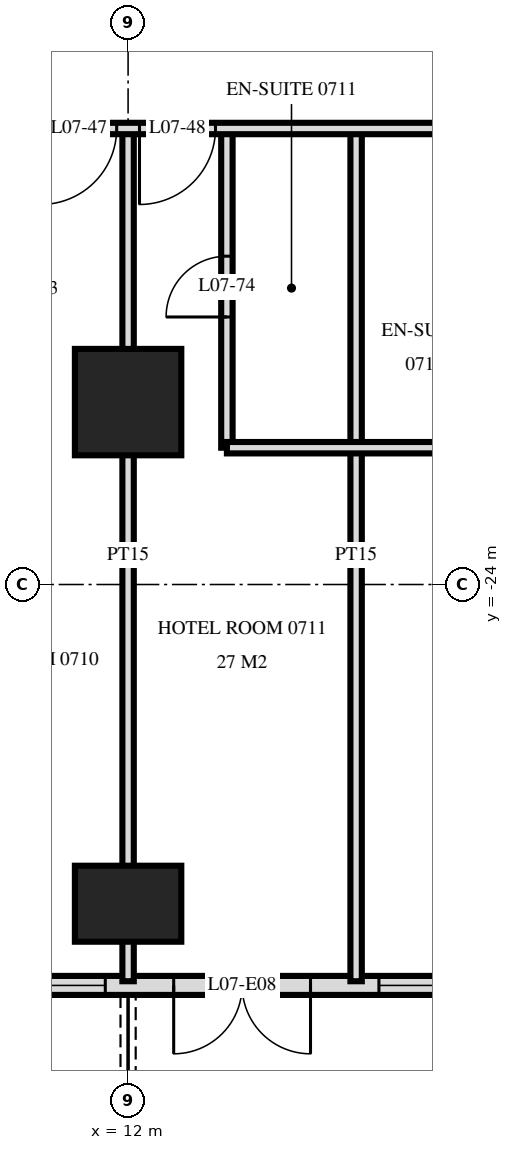
"""IFC4 building model, lengths in metres.
Left out: names, types, materials, properties, quantities, classifications, styles, units other than length and angle.
Written with IfcOpenShell. Run it as: python <this file> out.ifc"""

import sys

from ifc_helpers import new_model, si_unit, direction, frame, frame_2d, origin, origin_2d, place, context, subcontext, project, spatial, rectangle, extrude, element, fill, save


model = new_model("IFC4")
c1 = context("Model", 3, precision=1e-05, world=origin(), true_north=direction((0.0, 1.0)))
c2 = subcontext(c1, "Body", "Model", "MODEL_VIEW")
j1 = project(units=[si_unit("LENGTHUNIT", "METRE"), si_unit("PLANEANGLEUNIT", "RADIAN")], contexts=[c1])
p1 = place(None, origin())
s1 = spatial("IfcSite", under=j1, at=p1, CompositionType="ELEMENT")
p2 = place(p1, origin())
s2 = spatial("IfcBuilding", under=s1, at=p2, CompositionType="ELEMENT")
p3 = place(p2, frame((0.0, 0.0, 34.8)))
s3 = spatial("IfcBuildingStorey", under=s2, at=p3, CompositionType="ELEMENT", Elevation=34.8)
p4 = place(p3, frame((12.0, -28.2, 0.0), z_axis=(0.0, 0.0, 1.0), x_axis=(1.0, 0.0, 0.0)))
e1 = element("IfcColumn", 1, at=p4, inside=s3, PredefinedType="COLUMN", context=c2, shape_type="SweptSolid", body=[
    extrude(rectangle(XDim=1.4, YDim=1.0, at=origin_2d()), origin(), (0.0, 0.0, 1.0), 3.6),
])
p5 = place(p3, frame((12.0, -21.6, 0.0), z_axis=(0.0, 0.0, 1.0), x_axis=(1.0, 0.0, 0.0)))
e2 = element("IfcColumn", 2, at=p5, inside=s3, PredefinedType="COLUMN", context=c2, shape_type="SweptSolid", body=[
    extrude(rectangle(XDim=1.4, YDim=1.4, at=origin_2d()), origin(), (0.0, 0.0, 1.0), 3.6),
])
p6 = place(p3, frame((-28.775, -29.275, 0.0), z_axis=(0.0, 0.0, 1.0), x_axis=(1.0, 0.0, 0.0)))
e3 = element("IfcWall", 3, at=p6, inside=s3, PredefinedType="SOLIDWALL", context=c2, shape_type="SweptSolid", body=[
    extrude(rectangle(XDim=57.551, YDim=0.25, at=frame_2d((28.775, 0.0))), origin(), (0.0, 0.0, 1.0), 3.32),
])
p7 = place(p6, frame((0.575, 0.0, 0.0)))
e4 = element("IfcOpeningElement", 4, at=p7, cuts=e3, PredefinedType="OPENING", context=c2, shape_type="SweptSolid", body=[
    extrude(rectangle(XDim=1.8, YDim=2.4, at=frame_2d((0.9, 1.2))), frame((0.0, 0.135, 0.0), z_axis=(0.0, -1.0, 0.0), x_axis=(1.0, 0.0, 0.0)), (0.0, 0.0, 1.0), 0.27),
])
p8 = place(p6, frame((5.375, 0.0, 0.0)))
e5 = element("IfcOpeningElement", 5, at=p8, cuts=e3, PredefinedType="OPENING", context=c2, shape_type="SweptSolid", body=[
    extrude(rectangle(XDim=1.8, YDim=2.4, at=frame_2d((0.9, 1.2))), frame((0.0, 0.135, 0.0), z_axis=(0.0, -1.0, 0.0), x_axis=(1.0, 0.0, 0.0)), (0.0, 0.0, 1.0), 0.27),
])
p9 = place(p6, frame((8.075, 0.0, 0.3)))
e6 = element("IfcOpeningElement", 6, at=p9, cuts=e3, PredefinedType="OPENING", context=c2, shape_type="SweptSolid", body=[
    extrude(rectangle(XDim=2.4, YDim=2.1, at=frame_2d((1.2, 1.05))), frame((0.0, 0.135, 0.0), z_axis=(0.0, -1.0, 0.0), x_axis=(1.0, 0.0, 0.0)), (0.0, 0.0, 1.0), 0.27),
])
p10 = place(p6, frame((11.375, 0.0, 0.0)))
e7 = element("IfcOpeningElement", 7, at=p10, cuts=e3, PredefinedType="OPENING", context=c2, shape_type="SweptSolid", body=[
    extrude(rectangle(XDim=1.8, YDim=2.4, at=frame_2d((0.9, 1.2))), frame((0.0, 0.135, 0.0), z_axis=(0.0, -1.0, 0.0), x_axis=(1.0, 0.0, 0.0)), (0.0, 0.0, 1.0), 0.27),
])
p11 = place(p6, frame((14.075, 0.0, 0.3)))
e8 = element("IfcOpeningElement", 8, at=p11, cuts=e3, PredefinedType="OPENING", context=c2, shape_type="SweptSolid", body=[
    extrude(rectangle(XDim=2.4, YDim=2.1, at=frame_2d((1.2, 1.05))), frame((0.0, 0.135, 0.0), z_axis=(0.0, -1.0, 0.0), x_axis=(1.0, 0.0, 0.0)), (0.0, 0.0, 1.0), 0.27),
])
p12 = place(p6, frame((17.375, 0.0, 0.0)))
e9 = element("IfcOpeningElement", 9, at=p12, cuts=e3, PredefinedType="OPENING", context=c2, shape_type="SweptSolid", body=[
    extrude(rectangle(XDim=1.8, YDim=2.4, at=frame_2d((0.9, 1.2))), frame((0.0, 0.135, 0.0), z_axis=(0.0, -1.0, 0.0), x_axis=(1.0, 0.0, 0.0)), (0.0, 0.0, 1.0), 0.27),
])
p13 = place(p6, frame((20.075, 0.0, 0.3)))
e10 = element("IfcOpeningElement", 10, at=p13, cuts=e3, PredefinedType="OPENING", context=c2, shape_type="SweptSolid", body=[
    extrude(rectangle(XDim=2.4, YDim=2.1, at=frame_2d((1.2, 1.05))), frame((0.0, 0.135, 0.0), z_axis=(0.0, -1.0, 0.0), x_axis=(1.0, 0.0, 0.0)), (0.0, 0.0, 1.0), 0.27),
])
p14 = place(p6, frame((23.075, 0.0, 0.3)))
e11 = element("IfcOpeningElement", 11, at=p14, cuts=e3, PredefinedType="OPENING", context=c2, shape_type="SweptSolid", body=[
    extrude(rectangle(XDim=2.4, YDim=2.1, at=frame_2d((1.2, 1.05))), frame((0.0, 0.135, 0.0), z_axis=(0.0, -1.0, 0.0), x_axis=(1.0, 0.0, 0.0)), (0.0, 0.0, 1.0), 0.27),
])
p15 = place(p6, frame((26.375, 0.0, 0.0)))
e12 = element("IfcOpeningElement", 12, at=p15, cuts=e3, PredefinedType="OPENING", context=c2, shape_type="SweptSolid", body=[
    extrude(rectangle(XDim=1.8, YDim=2.4, at=frame_2d((0.9, 1.2))), frame((0.0, 0.135, 0.0), z_axis=(0.0, -1.0, 0.0), x_axis=(1.0, 0.0, 0.0)), (0.0, 0.0, 1.0), 0.27),
])
p16 = place(p6, frame((29.375, 0.0, 0.0)))
e13 = element("IfcOpeningElement", 13, at=p16, cuts=e3, PredefinedType="OPENING", context=c2, shape_type="SweptSolid", body=[
    extrude(rectangle(XDim=1.8, YDim=2.4, at=frame_2d((0.9, 1.2))), frame((0.0, 0.135, 0.0), z_axis=(0.0, -1.0, 0.0), x_axis=(1.0, 0.0, 0.0)), (0.0, 0.0, 1.0), 0.27),
])
p17 = place(p6, frame((32.075, 0.0, 0.3)))
e14 = element("IfcOpeningElement", 14, at=p17, cuts=e3, PredefinedType="OPENING", context=c2, shape_type="SweptSolid", body=[
    extrude(rectangle(XDim=2.4, YDim=2.1, at=frame_2d((1.2, 1.05))), frame((0.0, 0.135, 0.0), z_axis=(0.0, -1.0, 0.0), x_axis=(1.0, 0.0, 0.0)), (0.0, 0.0, 1.0), 0.27),
])
p18 = place(p6, frame((35.375, 0.0, 0.0)))
e15 = element("IfcOpeningElement", 15, at=p18, cuts=e3, PredefinedType="OPENING", context=c2, shape_type="SweptSolid", body=[
    extrude(rectangle(XDim=1.8, YDim=2.4, at=frame_2d((0.9, 1.2))), frame((0.0, 0.135, 0.0), z_axis=(0.0, -1.0, 0.0), x_axis=(1.0, 0.0, 0.0)), (0.0, 0.0, 1.0), 0.27),
])
p19 = place(p6, frame((38.075, 0.0, 0.3)))
e16 = element("IfcOpeningElement", 16, at=p19, cuts=e3, PredefinedType="OPENING", context=c2, shape_type="SweptSolid", body=[
    extrude(rectangle(XDim=2.4, YDim=2.1, at=frame_2d((1.2, 1.05))), frame((0.0, 0.135, 0.0), z_axis=(0.0, -1.0, 0.0), x_axis=(1.0, 0.0, 0.0)), (0.0, 0.0, 1.0), 0.27),
])
p20 = place(p6, frame((41.375, 0.0, 0.0)))
e17 = element("IfcOpeningElement", 17, at=p20, cuts=e3, PredefinedType="OPENING", context=c2, shape_type="SweptSolid", body=[
    extrude(rectangle(XDim=1.8, YDim=2.4, at=frame_2d((0.9, 1.2))), frame((0.0, 0.135, 0.0), z_axis=(0.0, -1.0, 0.0), x_axis=(1.0, 0.0, 0.0)), (0.0, 0.0, 1.0), 0.27),
])
p21 = place(p6, frame((44.075, 0.0, 0.3)))
e18 = element("IfcOpeningElement", 18, at=p21, cuts=e3, PredefinedType="OPENING", context=c2, shape_type="SweptSolid", body=[
    extrude(rectangle(XDim=2.4, YDim=2.1, at=frame_2d((1.2, 1.05))), frame((0.0, 0.135, 0.0), z_axis=(0.0, -1.0, 0.0), x_axis=(1.0, 0.0, 0.0)), (0.0, 0.0, 1.0), 0.27),
])
p22 = place(p6, frame((47.375, 0.0, 0.0)))
e19 = element("IfcOpeningElement", 19, at=p22, cuts=e3, PredefinedType="OPENING", context=c2, shape_type="SweptSolid", body=[
    extrude(rectangle(XDim=1.8, YDim=2.4, at=frame_2d((0.9, 1.2))), frame((0.0, 0.135, 0.0), z_axis=(0.0, -1.0, 0.0), x_axis=(1.0, 0.0, 0.0)), (0.0, 0.0, 1.0), 0.27),
])
p23 = place(p6, frame((50.075, 0.0, 0.3)))
e20 = element("IfcOpeningElement", 20, at=p23, cuts=e3, PredefinedType="OPENING", context=c2, shape_type="SweptSolid", body=[
    extrude(rectangle(XDim=2.4, YDim=2.1, at=frame_2d((1.2, 1.05))), frame((0.0, 0.135, 0.0), z_axis=(0.0, -1.0, 0.0), x_axis=(1.0, 0.0, 0.0)), (0.0, 0.0, 1.0), 0.27),
])
p24 = place(p6, frame((53.375, 0.0, 0.0)))
e21 = element("IfcOpeningElement", 21, at=p24, cuts=e3, PredefinedType="OPENING", context=c2, shape_type="SweptSolid", body=[
    extrude(rectangle(XDim=1.8, YDim=2.4, at=frame_2d((0.9, 1.2))), frame((0.0, 0.135, 0.0), z_axis=(0.0, -1.0, 0.0), x_axis=(1.0, 0.0, 0.0)), (0.0, 0.0, 1.0), 0.27),
])
p25 = place(p3, frame((15.0, -29.22, 0.0), z_axis=(0.0, 0.0, 1.0), x_axis=(0.0, 1.0, 0.0)))
e22 = element("IfcWall", 22, at=p25, inside=s3, PredefinedType="PARTITIONING", context=c2, shape_type="SweptSolid", body=[
    extrude(rectangle(XDim=11.22, YDim=0.15, at=frame_2d((5.61, 0.0))), origin(), (0.0, 0.0, 1.0), 3.32),
])
p26 = place(p3, frame((13.3, -22.2, 0.0), z_axis=(0.0, 0.0, 1.0), x_axis=(0.0, 1.0, 0.0)))
e23 = element("IfcWall", 23, at=p26, inside=s3, PredefinedType="PARTITIONING", context=c2, shape_type="SweptSolid", body=[
    extrude(rectangle(XDim=4.2, YDim=0.15, at=frame_2d((2.1, 0.0))), origin(), (0.0, 0.0, 1.0), 3.32),
])
p27 = place(p26, frame((1.72, 0.0, 0.0)))
e24 = element("IfcOpeningElement", 24, at=p27, cuts=e23, PredefinedType="OPENING", context=c2, shape_type="SweptSolid", body=[
    extrude(rectangle(XDim=0.8, YDim=2.1, at=frame_2d((0.4, 1.05))), frame((0.0, 0.085, 0.0), z_axis=(0.0, -1.0, 0.0), x_axis=(1.0, 0.0, 0.0)), (0.0, 0.0, 1.0), 0.17),
])
p28 = place(p3, frame((12.0, -29.22, 0.0), z_axis=(0.0, 0.0, 1.0), x_axis=(0.0, 1.0, 0.0)))
e25 = element("IfcWall", 25, at=p28, inside=s3, PredefinedType="PARTITIONING", context=c2, shape_type="SweptSolid", body=[
    extrude(rectangle(XDim=11.22, YDim=0.15, at=frame_2d((5.61, 0.0))), origin(), (0.0, 0.0, 1.0), 3.32),
])
p29 = place(p3, frame((13.3, -22.2, 0.0), z_axis=(0.0, 0.0, 1.0), x_axis=(1.0, 0.0, 0.0)))
e26 = element("IfcWall", 26, at=p29, inside=s3, PredefinedType="PARTITIONING", context=c2, shape_type="SweptSolid", body=[
    extrude(rectangle(XDim=4.4, YDim=0.15, at=frame_2d((2.2, 0.0))), origin(), (0.0, 0.0, 1.0), 3.32),
])
p30 = place(p3, frame((-33.12, -18.0, 0.0), z_axis=(0.0, 0.0, 1.0), x_axis=(1.0, 0.0, 0.0)))
e27 = element("IfcWall", 27, at=p30, inside=s3, PredefinedType="PARTITIONING", context=c2, shape_type="SweptSolid", body=[
    extrude(rectangle(XDim=66.24, YDim=0.15, at=frame_2d((33.12, 0.0))), origin(), (0.0, 0.0, 1.0), 3.32),
])
p31 = place(p30, frame((12.27, 0.0, 0.0)))
e28 = element("IfcOpeningElement", 28, at=p31, cuts=e27, PredefinedType="OPENING", context=c2, shape_type="SweptSolid", body=[
    extrude(rectangle(XDim=1.0, YDim=2.1, at=frame_2d((0.5, 1.05))), frame((0.0, 0.085, 0.0), z_axis=(0.0, -1.0, 0.0), x_axis=(1.0, 0.0, 0.0)), (0.0, 0.0, 1.0), 0.17),
])
p32 = place(p30, frame((16.97, 0.0, 0.0)))
e29 = element("IfcOpeningElement", 29, at=p32, cuts=e27, PredefinedType="OPENING", context=c2, shape_type="SweptSolid", body=[
    extrude(rectangle(XDim=1.0, YDim=2.1, at=frame_2d((0.5, 1.05))), frame((0.0, 0.085, 0.0), z_axis=(0.0, -1.0, 0.0), x_axis=(1.0, 0.0, 0.0)), (0.0, 0.0, 1.0), 0.17),
])
p33 = place(p30, frame((18.27, 0.0, 0.0)))
e30 = element("IfcOpeningElement", 30, at=p33, cuts=e27, PredefinedType="OPENING", context=c2, shape_type="SweptSolid", body=[
    extrude(rectangle(XDim=1.0, YDim=2.1, at=frame_2d((0.5, 1.05))), frame((0.0, 0.085, 0.0), z_axis=(0.0, -1.0, 0.0), x_axis=(1.0, 0.0, 0.0)), (0.0, 0.0, 1.0), 0.17),
])
p34 = place(p30, frame((22.97, 0.0, 0.0)))
e31 = element("IfcOpeningElement", 31, at=p34, cuts=e27, PredefinedType="OPENING", context=c2, shape_type="SweptSolid", body=[
    extrude(rectangle(XDim=1.0, YDim=2.1, at=frame_2d((0.5, 1.05))), frame((0.0, 0.085, 0.0), z_axis=(0.0, -1.0, 0.0), x_axis=(1.0, 0.0, 0.0)), (0.0, 0.0, 1.0), 0.17),
])
p35 = place(p30, frame((24.27, 0.0, 0.0)))
e32 = element("IfcOpeningElement", 32, at=p35, cuts=e27, PredefinedType="OPENING", context=c2, shape_type="SweptSolid", body=[
    extrude(rectangle(XDim=1.0, YDim=2.1, at=frame_2d((0.5, 1.05))), frame((0.0, 0.085, 0.0), z_axis=(0.0, -1.0, 0.0), x_axis=(1.0, 0.0, 0.0)), (0.0, 0.0, 1.0), 0.17),
])
p36 = place(p30, frame((28.97, 0.0, 0.0)))
e33 = element("IfcOpeningElement", 33, at=p36, cuts=e27, PredefinedType="OPENING", context=c2, shape_type="SweptSolid", body=[
    extrude(rectangle(XDim=1.0, YDim=2.1, at=frame_2d((0.5, 1.05))), frame((0.0, 0.085, 0.0), z_axis=(0.0, -1.0, 0.0), x_axis=(1.0, 0.0, 0.0)), (0.0, 0.0, 1.0), 0.17),
])
p37 = place(p30, frame((30.27, 0.0, 0.0)))
e34 = element("IfcOpeningElement", 34, at=p37, cuts=e27, PredefinedType="OPENING", context=c2, shape_type="SweptSolid", body=[
    extrude(rectangle(XDim=1.0, YDim=2.1, at=frame_2d((0.5, 1.05))), frame((0.0, 0.085, 0.0), z_axis=(0.0, -1.0, 0.0), x_axis=(1.0, 0.0, 0.0)), (0.0, 0.0, 1.0), 0.17),
])
p38 = place(p30, frame((34.97, 0.0, 0.0)))
e35 = element("IfcOpeningElement", 35, at=p38, cuts=e27, PredefinedType="OPENING", context=c2, shape_type="SweptSolid", body=[
    extrude(rectangle(XDim=1.0, YDim=2.1, at=frame_2d((0.5, 1.05))), frame((0.0, 0.085, 0.0), z_axis=(0.0, -1.0, 0.0), x_axis=(1.0, 0.0, 0.0)), (0.0, 0.0, 1.0), 0.17),
])
p39 = place(p30, frame((37.27, 0.0, 0.0)))
e36 = element("IfcOpeningElement", 36, at=p39, cuts=e27, PredefinedType="OPENING", context=c2, shape_type="SweptSolid", body=[
    extrude(rectangle(XDim=1.0, YDim=2.1, at=frame_2d((0.5, 1.05))), frame((0.0, 0.085, 0.0), z_axis=(0.0, -1.0, 0.0), x_axis=(1.0, 0.0, 0.0)), (0.0, 0.0, 1.0), 0.17),
])
p40 = place(p30, frame((43.97, 0.0, 0.0)))
e37 = element("IfcOpeningElement", 37, at=p40, cuts=e27, PredefinedType="OPENING", context=c2, shape_type="SweptSolid", body=[
    extrude(rectangle(XDim=1.0, YDim=2.1, at=frame_2d((0.5, 1.05))), frame((0.0, 0.085, 0.0), z_axis=(0.0, -1.0, 0.0), x_axis=(1.0, 0.0, 0.0)), (0.0, 0.0, 1.0), 0.17),
])
p41 = place(p30, frame((45.27, 0.0, 0.0)))
e38 = element("IfcOpeningElement", 38, at=p41, cuts=e27, PredefinedType="OPENING", context=c2, shape_type="SweptSolid", body=[
    extrude(rectangle(XDim=1.0, YDim=2.1, at=frame_2d((0.5, 1.05))), frame((0.0, 0.085, 0.0), z_axis=(0.0, -1.0, 0.0), x_axis=(1.0, 0.0, 0.0)), (0.0, 0.0, 1.0), 0.17),
])
p42 = place(p30, frame((51.22, 0.0, 0.0)))
e39 = element("IfcOpeningElement", 39, at=p42, cuts=e27, PredefinedType="OPENING", context=c2, shape_type="SweptSolid", body=[
    extrude(rectangle(XDim=1.0, YDim=2.1, at=frame_2d((0.5, 1.05))), frame((0.0, 0.085, 0.0), z_axis=(0.0, -1.0, 0.0), x_axis=(1.0, 0.0, 0.0)), (0.0, 0.0, 1.0), 0.17),
])
p43 = place(p30, frame((54.27, 0.0, 0.0)))
e40 = element("IfcOpeningElement", 40, at=p43, cuts=e27, PredefinedType="OPENING", context=c2, shape_type="SweptSolid", body=[
    extrude(rectangle(XDim=1.0, YDim=2.1, at=frame_2d((0.5, 1.05))), frame((0.0, 0.085, 0.0), z_axis=(0.0, -1.0, 0.0), x_axis=(1.0, 0.0, 0.0)), (0.0, 0.0, 1.0), 0.17),
])
p44 = place(p30, frame((6.07, 0.0, 0.0)))
e41 = element("IfcOpeningElement", 41, at=p44, cuts=e27, PredefinedType="OPENING", context=c2, shape_type="SweptSolid", body=[
    extrude(rectangle(XDim=1.0, YDim=2.1, at=frame_2d((0.5, 1.05))), frame((0.0, 0.085, 0.0), z_axis=(0.0, -1.0, 0.0), x_axis=(1.0, 0.0, 0.0)), (0.0, 0.0, 1.0), 0.17),
])
p45 = place(p30, frame((63.37, 0.0, 0.0)))
e42 = element("IfcOpeningElement", 42, at=p45, cuts=e27, PredefinedType="OPENING", context=c2, shape_type="SweptSolid", body=[
    extrude(rectangle(XDim=1.0, YDim=2.1, at=frame_2d((0.5, 1.05))), frame((0.0, 0.085, 0.0), z_axis=(0.0, -1.0, 0.0), x_axis=(1.0, 0.0, 0.0)), (0.0, 0.0, 1.0), 0.17),
])
p46 = place(p19, origin())
e43 = element("IfcWindow", 43, at=p46, inside=s3, PartitioningType="SINGLE_PANEL", PredefinedType="WINDOW", context=c2, shape_type="SweptSolid", body=[
    extrude(rectangle(XDim=2.4, YDim=2.1, at=frame_2d((1.2, 1.05))), frame((0.0, 0.03, 0.0), z_axis=(0.0, -1.0, 0.0), x_axis=(1.0, 0.0, 0.0)), (0.0, 0.0, 1.0), 0.06),
])
fill(e16, e43)
p47 = place(p20, frame((0.9, 0.0, 0.0), z_axis=(0.0, 0.0, 1.0), x_axis=(-1.0, 0.0, 0.0)))
e44 = element("IfcDoor", 44, at=p47, inside=s3, OperationType="DOUBLE_DOOR_SINGLE_SWING", PredefinedType="DOOR", context=c2, shape_type="SweptSolid", body=[
    extrude(rectangle(XDim=1.8, YDim=2.4, at=frame_2d((0.0, 1.2))), frame((0.0, -0.025, 0.0), z_axis=(0.0, 1.0, 0.0), x_axis=(-1.0, 0.0, 0.0)), (0.0, 0.0, 1.0), 0.05),
])
fill(e17, e44)
p48 = place(p21, origin())
e45 = element("IfcWindow", 45, at=p48, inside=s3, PartitioningType="SINGLE_PANEL", PredefinedType="WINDOW", context=c2, shape_type="SweptSolid", body=[
    extrude(rectangle(XDim=2.4, YDim=2.1, at=frame_2d((1.2, 1.05))), frame((0.0, 0.03, 0.0), z_axis=(0.0, -1.0, 0.0), x_axis=(1.0, 0.0, 0.0)), (0.0, 0.0, 1.0), 0.06),
])
fill(e18, e45)
p49 = place(p40, frame((0.5, 0.0, 0.0), z_axis=(0.0, 0.0, 1.0), x_axis=(-1.0, 0.0, 0.0)))
e46 = element("IfcDoor", 46, at=p49, inside=s3, OperationType="SINGLE_SWING_LEFT", PredefinedType="DOOR", context=c2, shape_type="SweptSolid", body=[
    extrude(rectangle(XDim=1.0, YDim=2.1, at=frame_2d((0.0, 1.05))), frame((0.0, -0.025, 0.0), z_axis=(0.0, 1.0, 0.0), x_axis=(-1.0, 0.0, 0.0)), (0.0, 0.0, 1.0), 0.05),
])
fill(e37, e46)
p50 = place(p41, frame((0.5, 0.0, 0.0), z_axis=(0.0, 0.0, 1.0), x_axis=(-1.0, 0.0, 0.0)))
e47 = element("IfcDoor", 47, at=p50, inside=s3, OperationType="SINGLE_SWING_LEFT", PredefinedType="DOOR", context=c2, shape_type="SweptSolid", body=[
    extrude(rectangle(XDim=1.0, YDim=2.1, at=frame_2d((0.0, 1.05))), frame((0.0, -0.025, 0.0), z_axis=(0.0, 1.0, 0.0), x_axis=(-1.0, 0.0, 0.0)), (0.0, 0.0, 1.0), 0.05),
])
fill(e38, e47)
p51 = place(p27, origin())
e48 = element("IfcDoor", 48, at=p51, inside=s3, OperationType="SINGLE_SWING_RIGHT", PredefinedType="DOOR", context=c2, shape_type="SweptSolid", body=[
    extrude(rectangle(XDim=0.8, YDim=2.1, at=frame_2d((0.4, 1.05))), frame((0.0, 0.025, 0.0), z_axis=(0.0, -1.0, 0.0), x_axis=(1.0, 0.0, 0.0)), (0.0, 0.0, 1.0), 0.05),
])
fill(e24, e48)
save(model, sys.argv[1])
